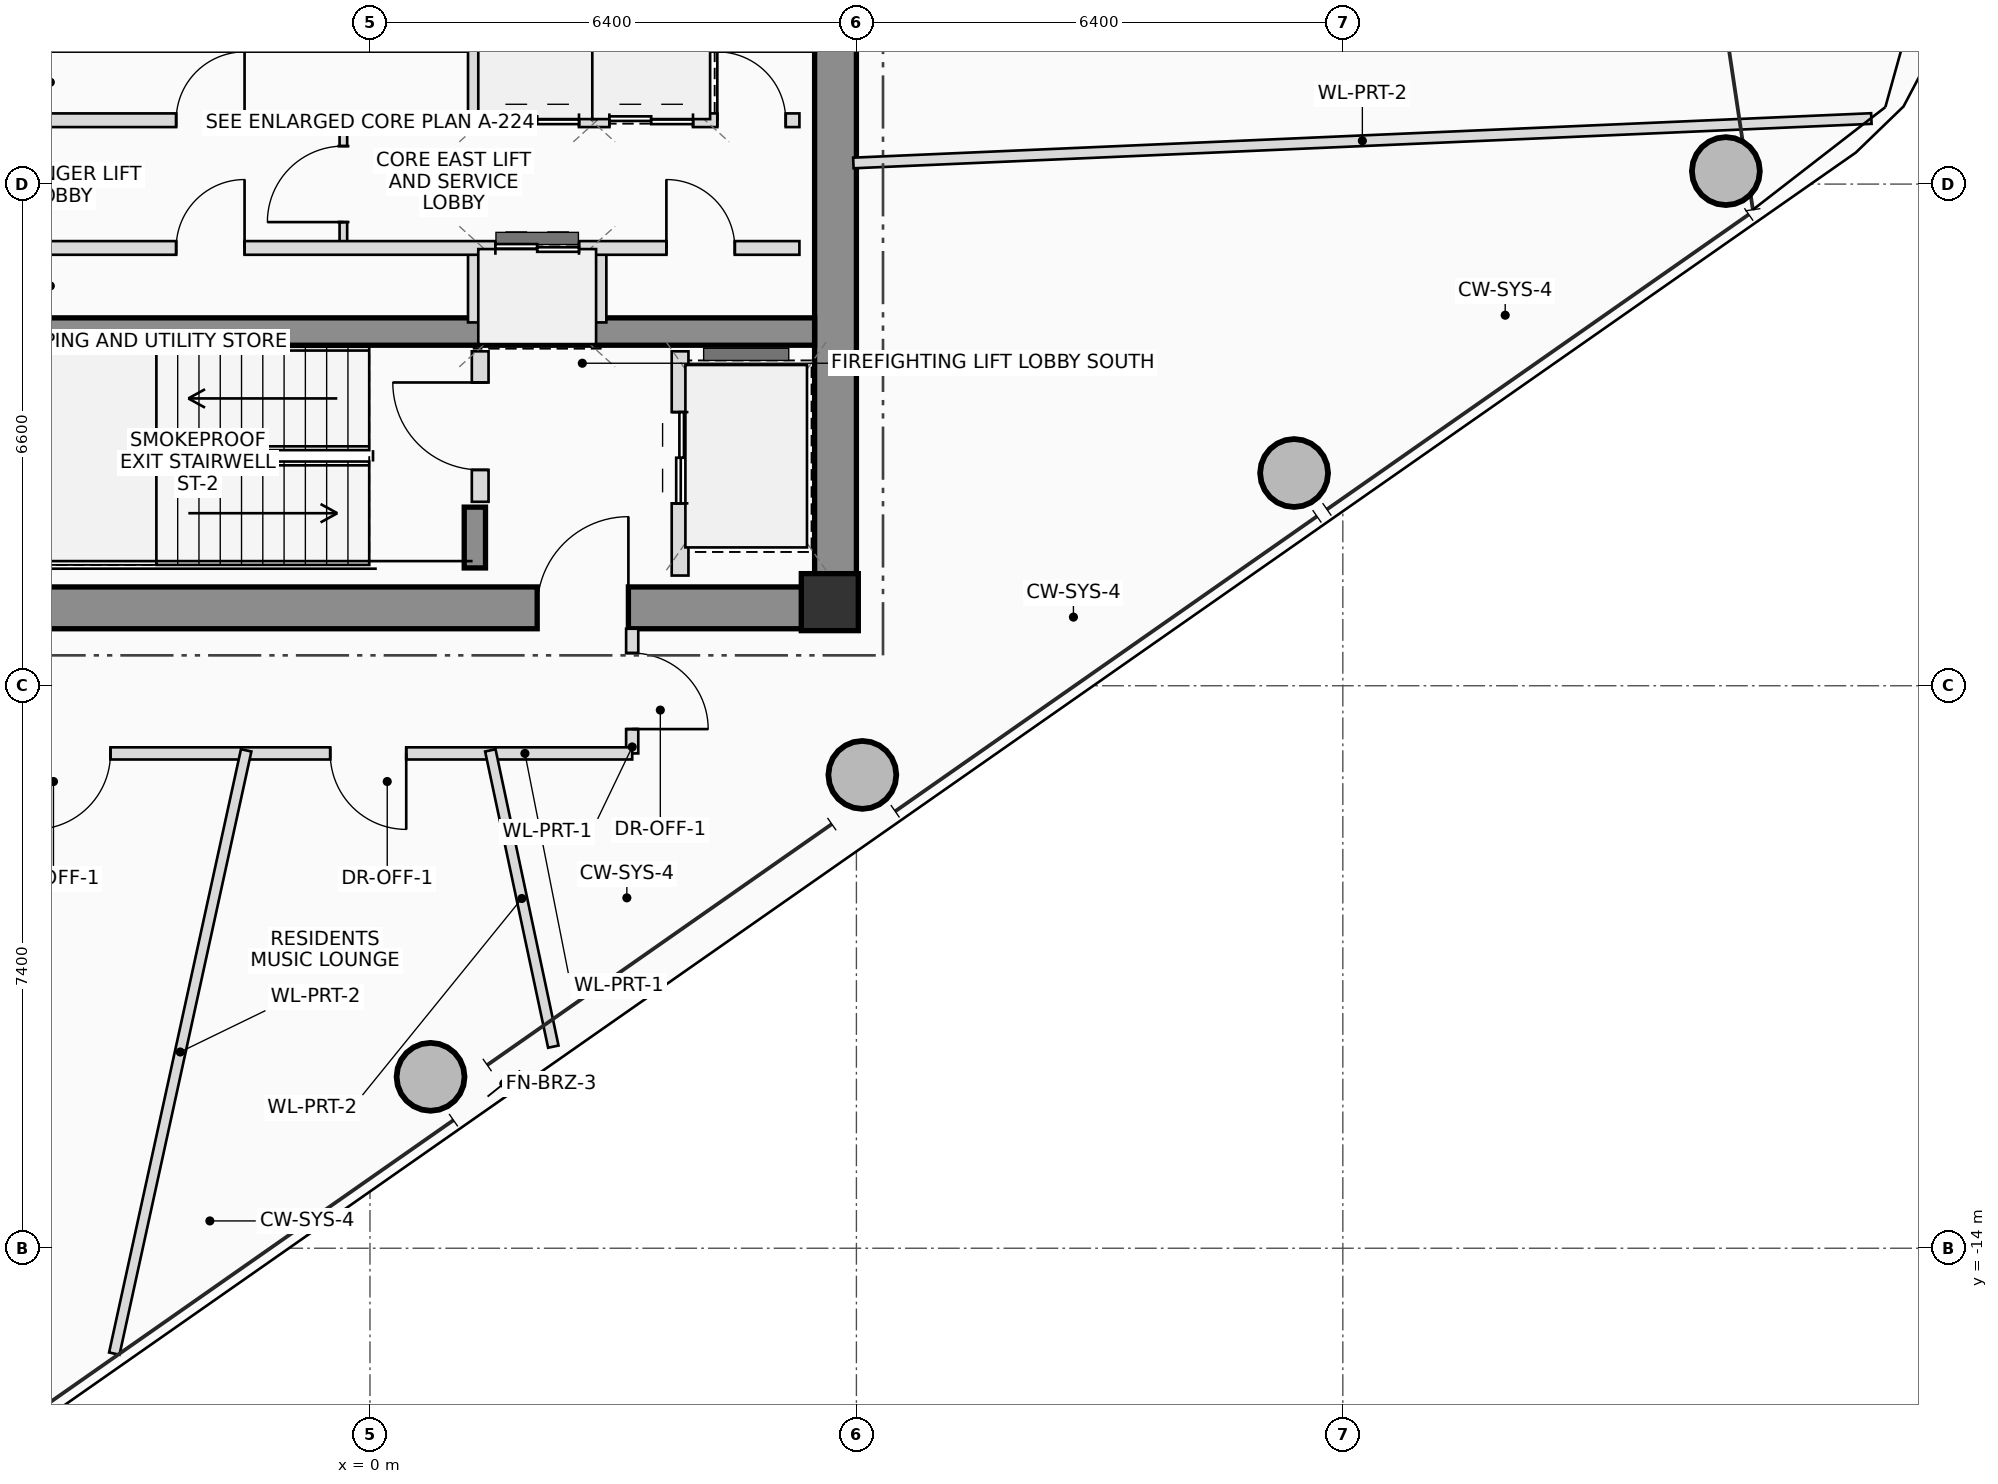
"""IFC4 building model, lengths in metres.
Left out: names, types, materials, properties, quantities, classifications, styles, units other than length and angle.
Written with IfcOpenShell. Run it as: python <this file> out.ifc"""

import sys

from ifc_helpers import new_model, si_unit, direction, frame, frame_2d, origin, origin_2d, place, context, subcontext, project, spatial, rectangle, hollow_circle, extrude, source, transform, mapped, element, fill, save


model = new_model("IFC4")
c1 = context("Model", 3, precision=1e-05, world=origin(), true_north=direction((0.0, 1.0)))
c2 = subcontext(c1, "Body", "Model", "MODEL_VIEW")
j1 = project(units=[si_unit("LENGTHUNIT", "METRE"), si_unit("PLANEANGLEUNIT", "RADIAN")], contexts=[c1])
p1 = place(None, origin())
s1 = spatial("IfcSite", under=j1, at=p1, CompositionType="ELEMENT")
p2 = place(p1, origin())
s2 = spatial("IfcBuilding", under=s1, at=p2, CompositionType="ELEMENT")
p3 = place(p2, frame((0.0, 0.0, 264.35)))
s3 = spatial("IfcBuildingStorey", under=s2, at=p3, CompositionType="ELEMENT", Elevation=264.35)
m1 = source(origin(), c2, "Body", "SweptSolid", [
    extrude(rectangle(XDim=0.75, YDim=0.75, at=origin_2d()), origin(), (0.0, 0.0, 1.0), 3.4),
])
p4 = place(p3, frame((6.05, -5.5, 0.0), z_axis=(0.0, 0.0, 1.0), x_axis=(1.0, 0.0, 0.0)))
e1 = element("IfcColumn", 1, at=p4, inside=s3, PredefinedType="COLUMN", context=c2, shape_type="MappedRepresentation", body=[
    mapped(m1, transform((0.0, 0.0, 0.0), scale=1.0)),
])
p5 = place(p3, frame((-6.4, -5.575, 0.0), z_axis=(0.0, 0.0, 1.0), x_axis=(1.0, 0.0, 0.0)))
e2 = element("IfcWall", 2, at=p5, inside=s3, PredefinedType="SHEAR", context=c2, shape_type="SweptSolid", body=[
    extrude(rectangle(XDim=12.8, YDim=0.55, at=frame_2d((6.4, 0.0))), origin(), (0.0, 0.0, 1.0), 3.4),
])
p6 = place(p5, frame((8.6, 0.0, 0.0)))
e3 = element("IfcOpeningElement", 3, at=p6, cuts=e2, PredefinedType="OPENING", context=c2, shape_type="SweptSolid", body=[
    extrude(rectangle(XDim=1.2, YDim=2.2, at=frame_2d((0.6, 1.1))), frame((0.0, 0.285, 0.0), z_axis=(0.0, -1.0, 0.0), x_axis=(1.0, 0.0, 0.0)), (0.0, 0.0, 1.0), 0.57),
])
p7 = place(p3, frame((6.125, -5.3, 0.0), z_axis=(0.0, 0.0, 1.0), x_axis=(0.0, 1.0, 0.0)))
e4 = element("IfcWall", 4, at=p7, inside=s3, PredefinedType="SHEAR", context=c2, shape_type="SweptSolid", body=[
    extrude(rectangle(XDim=10.6, YDim=0.55, at=frame_2d((5.3, 0.0))), origin(), (0.0, 0.0, 1.0), 3.4),
])
p8 = place(p3, frame((-5.85, -1.94, 0.0), z_axis=(0.0, 0.0, 1.0), x_axis=(1.0, 0.0, 0.0)))
e5 = element("IfcWall", 5, at=p8, inside=s3, PredefinedType="SHEAR", context=c2, shape_type="SweptSolid", body=[
    extrude(rectangle(XDim=11.7, YDim=0.36, at=frame_2d((5.85, 0.0))), origin(), (0.0, 0.0, 1.0), 3.4),
])
p9 = place(p3, frame((1.38, -5.05, 0.0), z_axis=(0.0, 0.0, 1.0), x_axis=(0.0, 1.0, 0.0)))
e6 = element("IfcWall", 6, at=p9, inside=s3, PredefinedType="SHEAR", context=c2, shape_type="SweptSolid", body=[
    extrude(rectangle(XDim=0.8, YDim=0.28, at=frame_2d((0.4, 0.0))), origin(), (0.0, 0.0, 1.0), 3.4),
])
m2 = source(origin(), c2, "Body", "SweptSolid", [
    extrude(hollow_circle(Radius=0.45, WallThickness=0.032, at=origin_2d()), origin(), (0.0, 0.0, 1.0), 3.4),
])
for number, where, z_axis, x_axis in (
    (7, (0.797, -11.745, 0.0), (0.0, 0.0, 1.0), (1.0, 0.0, 0.0)),
    (8, (6.478, -7.773, 0.0), (0.0, 0.0, 1.0), (1.0, 0.0, 0.0)),
    (9, (12.159, -3.801, 0.0), (0.0, 0.0, 1.0), (1.0, 0.0, 0.0)),
    (10, (17.84, 0.171, 0.0), (0.0, 0.0, 1.0), (1.0, 0.0, 0.0)),
):
    element("IfcColumn", number, at=place(p3, frame(where, z_axis=z_axis, x_axis=x_axis)), inside=s3, PredefinedType="COLUMN", context=c2, shape_type="MappedRepresentation", body=[
        mapped(m2, transform((0.0, 0.0, 0.0), scale=1.0)),
    ])
p10 = place(p3, frame((1.45, -4.18, 0.0), z_axis=(0.0, 0.0, 1.0), x_axis=(0.0, 1.0, 0.0)))
e11 = element("IfcWall", 11, at=p10, inside=s3, PredefinedType="PLUMBINGWALL", context=c2, shape_type="SweptSolid", body=[
    extrude(rectangle(XDim=1.98, YDim=0.22, at=frame_2d((0.99, 0.0))), origin(), (0.0, 0.0, 1.0), 3.2),
])
p11 = place(p10, frame((0.42, 0.0, 0.0)))
e12 = element("IfcOpeningElement", 12, at=p11, cuts=e11, PredefinedType="OPENING", context=c2, shape_type="SweptSolid", body=[
    extrude(rectangle(XDim=1.15, YDim=2.15, at=frame_2d((0.575, 1.075))), frame((0.0, 0.12, 0.0), z_axis=(0.0, -1.0, 0.0), x_axis=(1.0, 0.0, 0.0)), (0.0, 0.0, 1.0), 0.24),
])
p12 = place(p3, frame((4.08, -5.15, 0.0), z_axis=(0.0, 0.0, 1.0), x_axis=(0.0, 1.0, 0.0)))
e13 = element("IfcWall", 13, at=p12, inside=s3, PredefinedType="PLUMBINGWALL", context=c2, shape_type="SweptSolid", body=[
    extrude(rectangle(XDim=2.95, YDim=0.22, at=frame_2d((1.475, 0.0))), origin(), (0.0, 0.0, 1.0), 3.2),
])
p13 = place(p12, frame((0.95, 0.0, 0.0)))
e14 = element("IfcOpeningElement", 14, at=p13, cuts=e13, PredefinedType="OPENING", context=c2, shape_type="SweptSolid", body=[
    extrude(rectangle(XDim=1.2, YDim=2.25, at=frame_2d((0.6, 1.125))), frame((0.0, 0.12, 0.0), z_axis=(0.0, -1.0, 0.0), x_axis=(1.0, 0.0, 0.0)), (0.0, 0.0, 1.0), 0.24),
])
p14 = place(p3, frame((-0.35, -0.84, 0.0), z_axis=(0.0, 0.0, 1.0), x_axis=(0.0, 1.0, 0.0)))
e15 = element("IfcWall", 15, at=p14, inside=s3, PredefinedType="PARTITIONING", context=c2, shape_type="SweptSolid", body=[
    extrude(rectangle(XDim=1.68, YDim=0.1, at=frame_2d((0.84, 0.0))), origin(), (0.0, 0.0, 1.0), 3.2),
])
p15 = place(p14, frame((0.34, 0.0, 0.0)))
e16 = element("IfcOpeningElement", 16, at=p15, cuts=e15, PredefinedType="OPENING", context=c2, shape_type="SweptSolid", body=[
    extrude(rectangle(XDim=1.0, YDim=2.25, at=frame_2d((0.5, 1.125))), frame((0.0, 0.06, 0.0), z_axis=(0.0, -1.0, 0.0), x_axis=(1.0, 0.0, 0.0)), (0.0, 0.0, 1.0), 0.12),
])
for number, where, z_axis, x_axis in (
    (17, (1.38, 0.84, 0.0), (0.0, 0.0, 1.0), (0.0, 1.0, 0.0)),
    (18, (1.38, -1.82, 0.0), (0.0, 0.0, 1.0), (0.0, 1.0, 0.0)),
    (19, (3.02, 0.84, 0.0), (0.0, 0.0, 1.0), (0.0, 1.0, 0.0)),
    (20, (4.38, 0.84, 0.0), (0.0, 0.0, 1.0), (0.0, 1.0, 0.0)),
    (21, (3.02, -1.82, 0.0), (0.0, 0.0, 1.0), (0.0, 1.0, 0.0)),
):
    element("IfcWall", number, at=place(p3, frame(where, z_axis=z_axis, x_axis=x_axis)), inside=s3, PredefinedType="PLUMBINGWALL", context=c2, shape_type="SweptSolid", body=[
        extrude(rectangle(XDim=0.98, YDim=0.18, at=frame_2d((0.49, 0.0))), origin(), (0.0, 0.0, 1.0), 3.2),
    ])
p16 = place(p3, frame((-5.68, 0.84, 0.0), z_axis=(0.0, 0.0, 1.0), x_axis=(1.0, 0.0, 0.0)))
e22 = element("IfcWall", 22, at=p16, inside=s3, PredefinedType="PLUMBINGWALL", context=c2, shape_type="SweptSolid", body=[
    extrude(rectangle(XDim=11.33, YDim=0.18, at=frame_2d((5.665, 0.0))), origin(), (0.0, 0.0, 1.0), 3.2),
])
p17 = place(p16, frame((3.13, 0.0, 0.0)))
e23 = element("IfcOpeningElement", 23, at=p17, cuts=e22, PredefinedType="OPENING", context=c2, shape_type="SweptSolid", body=[
    extrude(rectangle(XDim=0.9, YDim=2.05, at=frame_2d((0.45, 1.025))), frame((0.0, 0.1, 0.0), z_axis=(0.0, -1.0, 0.0), x_axis=(1.0, 0.0, 0.0)), (0.0, 0.0, 1.0), 0.2),
])
p18 = place(p16, frame((7.33, 0.0, 0.0)))
e24 = element("IfcOpeningElement", 24, at=p18, cuts=e22, PredefinedType="OPENING", context=c2, shape_type="SweptSolid", body=[
    extrude(rectangle(XDim=1.1, YDim=2.2, at=frame_2d((0.55, 1.1))), frame((0.0, 0.1, 0.0), z_axis=(0.0, -1.0, 0.0), x_axis=(1.0, 0.0, 0.0)), (0.0, 0.0, 1.0), 0.2),
])
p19 = place(p16, frame((8.83, 0.0, 0.0)))
e25 = element("IfcOpeningElement", 25, at=p19, cuts=e22, PredefinedType="OPENING", context=c2, shape_type="SweptSolid", body=[
    extrude(rectangle(XDim=1.1, YDim=2.2, at=frame_2d((0.55, 1.1))), frame((0.0, 0.1, 0.0), z_axis=(0.0, -1.0, 0.0), x_axis=(1.0, 0.0, 0.0)), (0.0, 0.0, 1.0), 0.2),
])
p20 = place(p16, frame((10.25, 0.0, 0.0)))
e26 = element("IfcOpeningElement", 26, at=p20, cuts=e22, PredefinedType="OPENING", context=c2, shape_type="SweptSolid", body=[
    extrude(rectangle(XDim=0.9, YDim=2.05, at=frame_2d((0.45, 1.025))), frame((0.0, 0.1, 0.0), z_axis=(0.0, -1.0, 0.0), x_axis=(1.0, 0.0, 0.0)), (0.0, 0.0, 1.0), 0.2),
])
p21 = place(p3, frame((-5.68, -0.84, 0.0), z_axis=(0.0, 0.0, 1.0), x_axis=(1.0, 0.0, 0.0)))
e27 = element("IfcWall", 27, at=p21, inside=s3, PredefinedType="PLUMBINGWALL", context=c2, shape_type="SweptSolid", body=[
    extrude(rectangle(XDim=11.33, YDim=0.18, at=frame_2d((5.665, 0.0))), origin(), (0.0, 0.0, 1.0), 3.2),
])
p22 = place(p21, frame((3.13, 0.0, 0.0)))
e28 = element("IfcOpeningElement", 28, at=p22, cuts=e27, PredefinedType="OPENING", context=c2, shape_type="SweptSolid", body=[
    extrude(rectangle(XDim=0.9, YDim=2.05, at=frame_2d((0.45, 1.025))), frame((0.0, 0.1, 0.0), z_axis=(0.0, -1.0, 0.0), x_axis=(1.0, 0.0, 0.0)), (0.0, 0.0, 1.0), 0.2),
])
p23 = place(p21, frame((7.33, 0.0, 0.0)))
e29 = element("IfcOpeningElement", 29, at=p23, cuts=e27, PredefinedType="OPENING", context=c2, shape_type="SweptSolid", body=[
    extrude(rectangle(XDim=1.1, YDim=2.2, at=frame_2d((0.55, 1.1))), frame((0.0, 0.1, 0.0), z_axis=(0.0, -1.0, 0.0), x_axis=(1.0, 0.0, 0.0)), (0.0, 0.0, 1.0), 0.2),
])
p24 = place(p21, frame((9.58, 0.0, 0.0)))
e30 = element("IfcOpeningElement", 30, at=p24, cuts=e27, PredefinedType="OPENING", context=c2, shape_type="SweptSolid", body=[
    extrude(rectangle(XDim=0.9, YDim=2.05, at=frame_2d((0.45, 1.025))), frame((0.0, 0.1, 0.0), z_axis=(0.0, -1.0, 0.0), x_axis=(1.0, 0.0, 0.0)), (0.0, 0.0, 1.0), 0.2),
])
p25 = place(p3, frame((3.45, -5.85, 0.0), z_axis=(0.0, 0.0, 1.0), x_axis=(0.0, -1.0, 0.0)))
e31 = element("IfcWall", 31, at=p25, inside=s3, PredefinedType="PARTITIONING", context=c2, shape_type="SweptSolid", body=[
    extrude(rectangle(XDim=1.64, YDim=0.16, at=frame_2d((0.82, 0.0))), origin(), (0.0, 0.0, 1.0), 3.2),
])
p26 = place(p25, frame((0.32, 0.0, 0.0)))
e32 = element("IfcOpeningElement", 32, at=p26, cuts=e31, PredefinedType="OPENING", context=c2, shape_type="SweptSolid", body=[
    extrude(rectangle(XDim=1.0, YDim=2.25, at=frame_2d((0.5, 1.125))), frame((0.0, 0.09, 0.0), z_axis=(0.0, -1.0, 0.0), x_axis=(1.0, 0.0, 0.0)), (0.0, 0.0, 1.0), 0.18),
])
p27 = place(p3, frame((3.45, -7.49, 0.0), z_axis=(0.0, 0.0, 1.0), x_axis=(-1.0, 0.0, 0.0)))
e33 = element("IfcWall", 33, at=p27, inside=s3, PredefinedType="PARTITIONING", context=c2, shape_type="SweptSolid", body=[
    extrude(rectangle(XDim=9.81, YDim=0.16, at=frame_2d((4.905, 0.0))), origin(), (0.0, 0.0, 1.0), 2.605),
])
p28 = place(p27, frame((2.973, 0.0, 0.0)))
e34 = element("IfcOpeningElement", 34, at=p28, cuts=e33, PredefinedType="OPENING", context=c2, shape_type="SweptSolid", body=[
    extrude(rectangle(XDim=1.0, YDim=2.25, at=frame_2d((0.5, 1.125))), frame((0.0, 0.09, 0.0), z_axis=(0.0, -1.0, 0.0), x_axis=(1.0, 0.0, 0.0)), (0.0, 0.0, 1.0), 0.18),
])
p29 = place(p27, frame((6.865, 0.0, 0.0)))
e35 = element("IfcOpeningElement", 35, at=p29, cuts=e33, PredefinedType="OPENING", context=c2, shape_type="SweptSolid", body=[
    extrude(rectangle(XDim=1.0, YDim=2.25, at=frame_2d((0.5, 1.125))), frame((0.0, 0.09, 0.0), z_axis=(0.0, -1.0, 0.0), x_axis=(1.0, 0.0, 0.0)), (0.0, 0.0, 1.0), 0.18),
])
p30 = place(p3, frame((6.36, 0.278, 0.0), z_axis=(0.0, 0.0, 1.0), x_axis=(0.999047617824, 0.043633213494, 0.0)))
e36 = element("IfcWall", 36, at=p30, inside=s3, PredefinedType="PARTITIONING", context=c2, shape_type="SweptSolid", body=[
    extrude(rectangle(XDim=13.406, YDim=0.14, at=frame_2d((6.703, 0.0))), origin(), (0.0, 0.0, 1.0), 2.605),
])
p31 = place(p3, frame((-1.629, -7.45, 0.0), z_axis=(0.0, 0.0, 1.0), x_axis=(-0.213607255038, -0.976919618287, 0.0)))
e37 = element("IfcWall", 37, at=p31, inside=s3, PredefinedType="PARTITIONING", context=c2, shape_type="SweptSolid", body=[
    extrude(rectangle(XDim=8.124, YDim=0.14, at=frame_2d((4.062, 0.0))), origin(), (0.0, 0.0, 1.0), 2.765),
])
p32 = place(p3, frame((1.583, -7.45, 0.0), z_axis=(0.0, 0.0, 1.0), x_axis=(0.207930561362, -0.978143589485, 0.0)))
e38 = element("IfcWall", 38, at=p32, inside=s3, PredefinedType="PARTITIONING", context=c2, shape_type="SweptSolid", body=[
    extrude(rectangle(XDim=3.985, YDim=0.14, at=frame_2d((1.993, 0.0))), origin(), (0.0, 0.0, 1.0), 2.605),
])
p33 = place(p6, origin())
e39 = element("IfcDoor", 39, at=p33, inside=s3, OperationType="SINGLE_SWING_RIGHT", PredefinedType="DOOR", context=c2, shape_type="SweptSolid", body=[
    extrude(rectangle(XDim=1.2, YDim=2.2, at=frame_2d((0.6, 1.1))), frame((0.0, 0.025, 0.0), z_axis=(0.0, -1.0, 0.0), x_axis=(1.0, 0.0, 0.0)), (0.0, 0.0, 1.0), 0.05),
])
fill(e3, e39)
p34 = place(p11, origin())
e40 = element("IfcDoor", 40, at=p34, inside=s3, OperationType="SINGLE_SWING_RIGHT", PredefinedType="DOOR", context=c2, shape_type="SweptSolid", body=[
    extrude(rectangle(XDim=1.15, YDim=2.15, at=frame_2d((0.575, 1.075))), frame((0.0, 0.025, 0.0), z_axis=(0.0, -1.0, 0.0), x_axis=(1.0, 0.0, 0.0)), (0.0, 0.0, 1.0), 0.05),
])
fill(e12, e40)
p35 = place(p13, origin())
e41 = element("IfcDoor", 41, at=p35, inside=s3, OperationType="DOUBLE_DOOR_SLIDING", PredefinedType="DOOR", context=c2, shape_type="SweptSolid", body=[
    extrude(rectangle(XDim=1.2, YDim=2.25, at=frame_2d((0.6, 1.125))), frame((0.0, 0.025, 0.0), z_axis=(0.0, -1.0, 0.0), x_axis=(1.0, 0.0, 0.0)), (0.0, 0.0, 1.0), 0.05),
])
fill(e14, e41)
p36 = place(p15, origin())
e42 = element("IfcDoor", 42, at=p36, inside=s3, OperationType="SINGLE_SWING_LEFT", PredefinedType="DOOR", context=c2, shape_type="SweptSolid", body=[
    extrude(rectangle(XDim=1.0, YDim=2.25, at=frame_2d((0.5, 1.125))), frame((0.0, 0.025, 0.0), z_axis=(0.0, -1.0, 0.0), x_axis=(1.0, 0.0, 0.0)), (0.0, 0.0, 1.0), 0.05),
])
fill(e16, e42)
p37 = place(p17, origin())
e43 = element("IfcDoor", 43, at=p37, inside=s3, OperationType="SINGLE_SWING_RIGHT", PredefinedType="DOOR", context=c2, shape_type="SweptSolid", body=[
    extrude(rectangle(XDim=0.9, YDim=2.05, at=frame_2d((0.45, 1.025))), frame((0.0, 0.025, 0.0), z_axis=(0.0, -1.0, 0.0), x_axis=(1.0, 0.0, 0.0)), (0.0, 0.0, 1.0), 0.05),
])
fill(e23, e43)
p38 = place(p18, origin())
e44 = element("IfcDoor", 44, at=p38, inside=s3, OperationType="DOUBLE_DOOR_SLIDING", PredefinedType="DOOR", context=c2, shape_type="SweptSolid", body=[
    extrude(rectangle(XDim=1.1, YDim=2.2, at=frame_2d((0.55, 1.1))), frame((0.0, 0.025, 0.0), z_axis=(0.0, -1.0, 0.0), x_axis=(1.0, 0.0, 0.0)), (0.0, 0.0, 1.0), 0.05),
])
fill(e24, e44)
p39 = place(p19, origin())
e45 = element("IfcDoor", 45, at=p39, inside=s3, OperationType="DOUBLE_DOOR_SLIDING", PredefinedType="DOOR", context=c2, shape_type="SweptSolid", body=[
    extrude(rectangle(XDim=1.1, YDim=2.2, at=frame_2d((0.55, 1.1))), frame((0.0, 0.025, 0.0), z_axis=(0.0, -1.0, 0.0), x_axis=(1.0, 0.0, 0.0)), (0.0, 0.0, 1.0), 0.05),
])
fill(e25, e45)
p40 = place(p20, origin())
e46 = element("IfcDoor", 46, at=p40, inside=s3, OperationType="SINGLE_SWING_LEFT", PredefinedType="DOOR", context=c2, shape_type="SweptSolid", body=[
    extrude(rectangle(XDim=0.9, YDim=2.05, at=frame_2d((0.45, 1.025))), frame((0.0, 0.025, 0.0), z_axis=(0.0, -1.0, 0.0), x_axis=(1.0, 0.0, 0.0)), (0.0, 0.0, 1.0), 0.05),
])
fill(e26, e46)
p41 = place(p22, origin())
e47 = element("IfcDoor", 47, at=p41, inside=s3, OperationType="SINGLE_SWING_RIGHT", PredefinedType="DOOR", context=c2, shape_type="SweptSolid", body=[
    extrude(rectangle(XDim=0.9, YDim=2.05, at=frame_2d((0.45, 1.025))), frame((0.0, 0.025, 0.0), z_axis=(0.0, -1.0, 0.0), x_axis=(1.0, 0.0, 0.0)), (0.0, 0.0, 1.0), 0.05),
])
fill(e28, e47)
p42 = place(p23, origin())
e48 = element("IfcDoor", 48, at=p42, inside=s3, OperationType="DOUBLE_DOOR_SLIDING", PredefinedType="DOOR", context=c2, shape_type="SweptSolid", body=[
    extrude(rectangle(XDim=1.1, YDim=2.2, at=frame_2d((0.55, 1.1))), frame((0.0, 0.025, 0.0), z_axis=(0.0, -1.0, 0.0), x_axis=(1.0, 0.0, 0.0)), (0.0, 0.0, 1.0), 0.05),
])
fill(e29, e48)
p43 = place(p24, origin())
e49 = element("IfcDoor", 49, at=p43, inside=s3, OperationType="SINGLE_SWING_LEFT", PredefinedType="DOOR", context=c2, shape_type="SweptSolid", body=[
    extrude(rectangle(XDim=0.9, YDim=2.05, at=frame_2d((0.45, 1.025))), frame((0.0, 0.025, 0.0), z_axis=(0.0, -1.0, 0.0), x_axis=(1.0, 0.0, 0.0)), (0.0, 0.0, 1.0), 0.05),
])
fill(e30, e49)
p44 = place(p26, origin())
e50 = element("IfcDoor", 50, at=p44, inside=s3, OperationType="SINGLE_SWING_RIGHT", PredefinedType="DOOR", context=c2, shape_type="SweptSolid", body=[
    extrude(rectangle(XDim=1.0, YDim=2.25, at=frame_2d((0.5, 1.125))), frame((0.0, 0.025, 0.0), z_axis=(0.0, -1.0, 0.0), x_axis=(1.0, 0.0, 0.0)), (0.0, 0.0, 1.0), 0.05),
])
fill(e32, e50)
p45 = place(p28, origin())
e51 = element("IfcDoor", 51, at=p45, inside=s3, OperationType="SINGLE_SWING_LEFT", PredefinedType="DOOR", context=c2, shape_type="SweptSolid", body=[
    extrude(rectangle(XDim=1.0, YDim=2.25, at=frame_2d((0.5, 1.125))), frame((0.0, 0.025, 0.0), z_axis=(0.0, -1.0, 0.0), x_axis=(1.0, 0.0, 0.0)), (0.0, 0.0, 1.0), 0.05),
])
fill(e34, e51)
p46 = place(p29, origin())
e52 = element("IfcDoor", 52, at=p46, inside=s3, OperationType="SINGLE_SWING_RIGHT", PredefinedType="DOOR", context=c2, shape_type="SweptSolid", body=[
    extrude(rectangle(XDim=1.0, YDim=2.25, at=frame_2d((0.5, 1.125))), frame((0.0, 0.025, 0.0), z_axis=(0.0, -1.0, 0.0), x_axis=(1.0, 0.0, 0.0)), (0.0, 0.0, 1.0), 0.05),
])
fill(e35, e52)
save(model, sys.argv[1])
